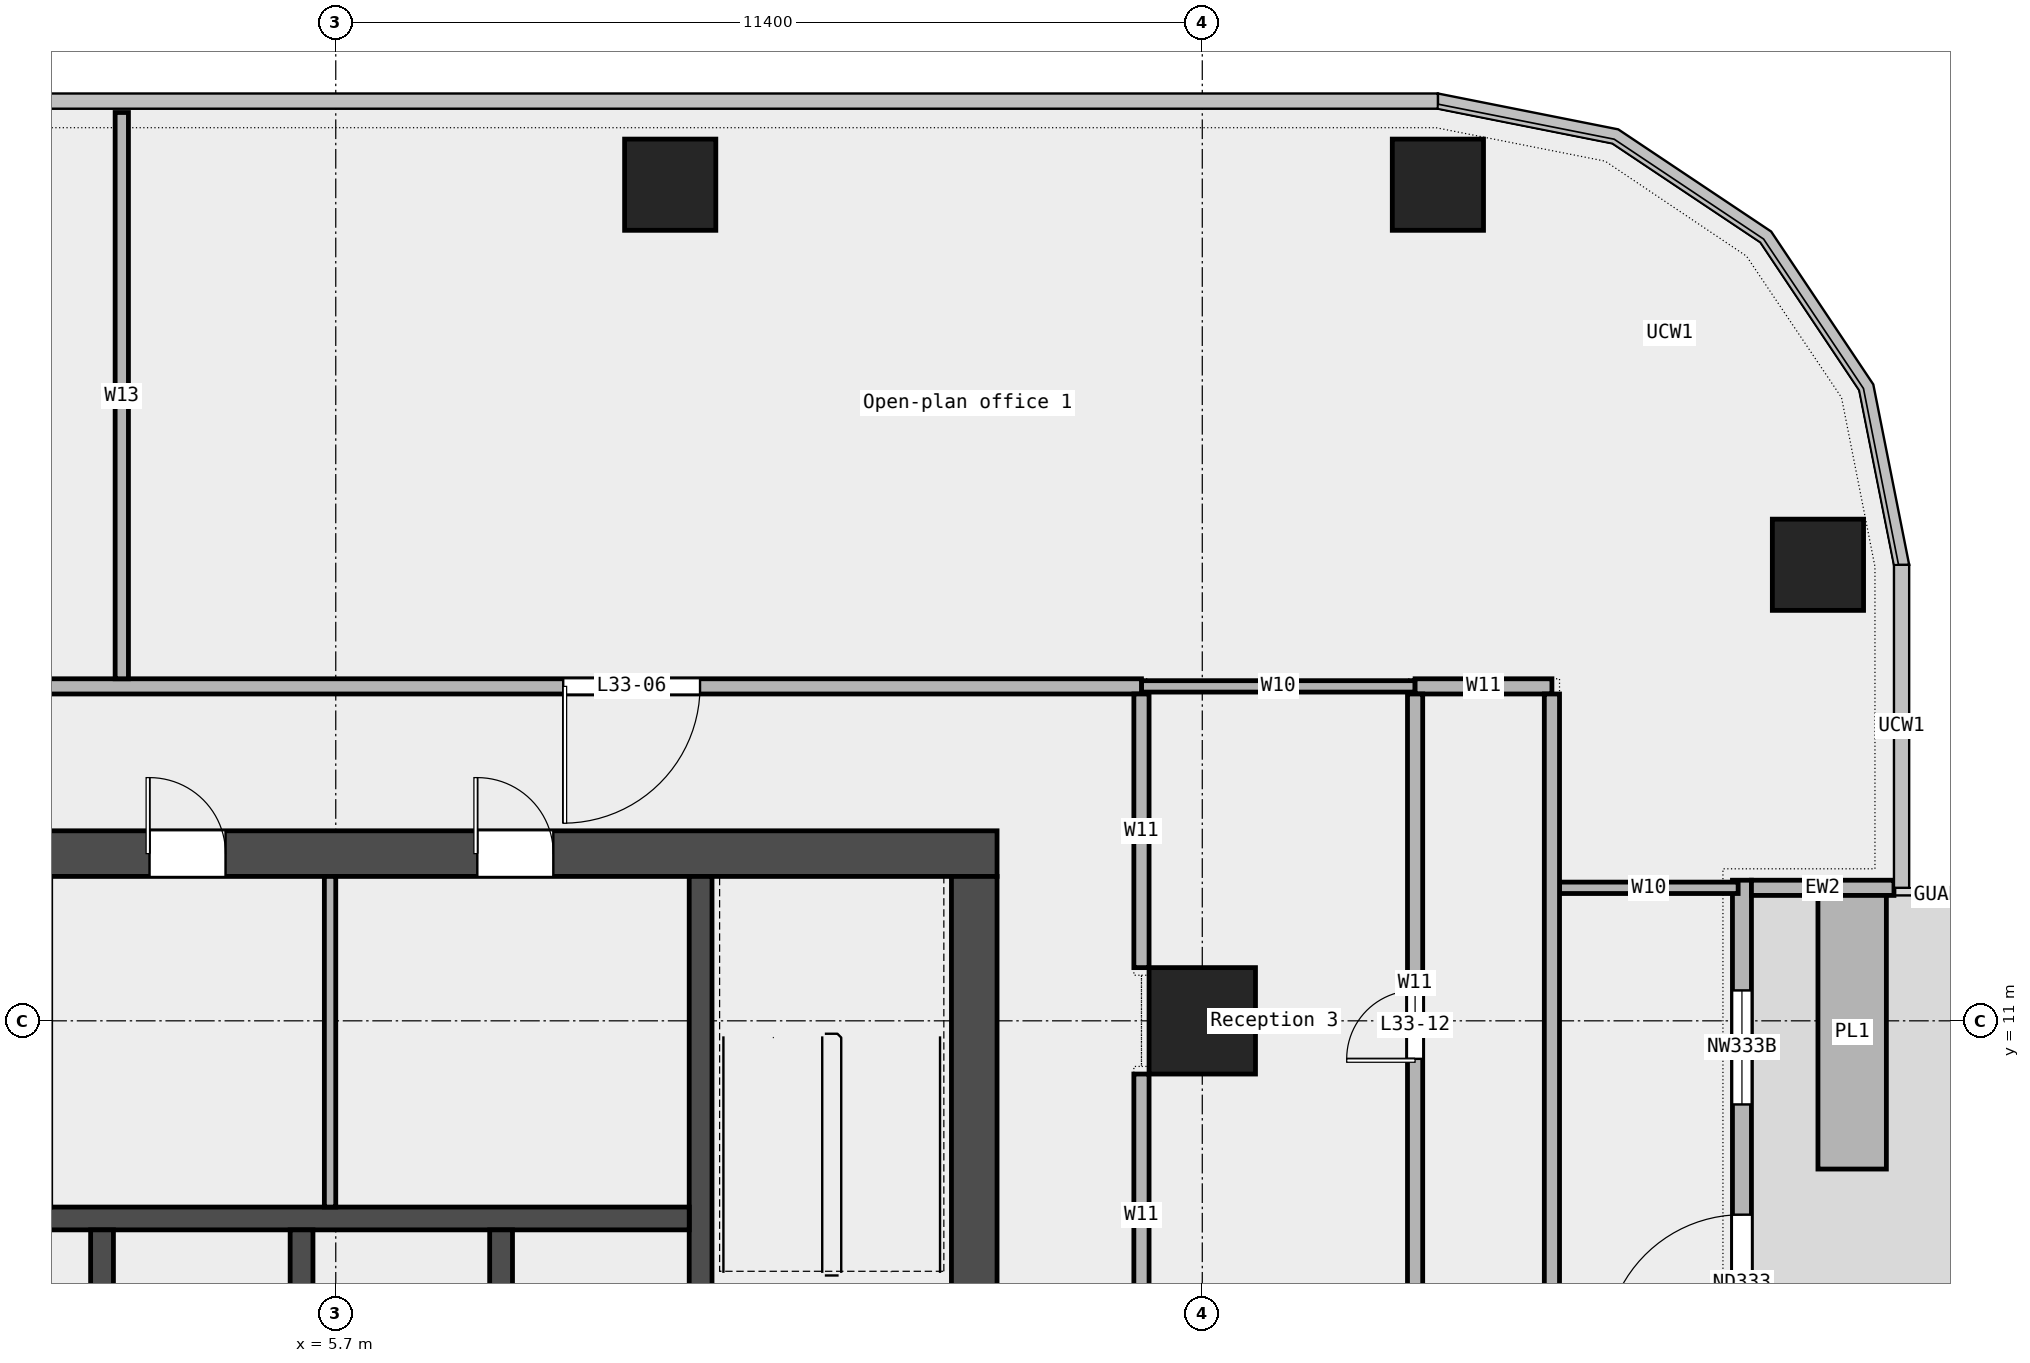
"""IFC4 building model, lengths in metres.
Left out: names, types, materials, properties, quantities, classifications, styles, units other than length and angle.
Written with IfcOpenShell. Run it as: python <this file> out.ifc"""

import sys

from ifc_helpers import new_model, si_unit, direction, frame, frame_2d, origin, origin_2d, place, context, subcontext, project, spatial, rectangle, extrude, element, fill, save


model = new_model("IFC4")
c1 = context("Model", 3, precision=1e-05, world=origin(), true_north=direction((0.0, 1.0)))
c2 = subcontext(c1, "Body", "Model", "MODEL_VIEW")
j1 = project(units=[si_unit("LENGTHUNIT", "METRE"), si_unit("PLANEANGLEUNIT", "RADIAN")], contexts=[c1])
p1 = place(None, origin())
s1 = spatial("IfcSite", under=j1, at=p1, CompositionType="ELEMENT")
p2 = place(p1, origin())
s2 = spatial("IfcBuilding", under=s1, at=p2, CompositionType="ELEMENT")
p3 = place(p2, frame((0.0, 0.0, 165.0)))
s3 = spatial("IfcBuildingStorey", under=s2, at=p3, CompositionType="ELEMENT", Elevation=165.0)
for number, where, z_axis, x_axis in (
    (1, (25.2, 17.0, 0.0), (0.0, 0.0, 1.0), (1.0, 0.0, 0.0)),
    (2, (20.2, 22.0, 0.0), (0.0, 0.0, 1.0), (1.0, 0.0, 0.0)),
    (3, (10.1, 22.0, 0.0), (0.0, 0.0, 1.0), (1.0, 0.0, 0.0)),
):
    element("IfcColumn", number, at=place(p3, frame(where, z_axis=z_axis, x_axis=x_axis)), inside=s3, PredefinedType="COLUMN", context=c2, shape_type="SweptSolid", body=[
        extrude(rectangle(XDim=1.2, YDim=1.2, at=origin_2d()), origin(), (0.0, 0.0, 1.0), 3.6),
    ])
p4 = place(p3, frame((17.1, 11.0, 0.0), z_axis=(0.0, 0.0, 1.0), x_axis=(1.0, 0.0, 0.0)))
e4 = element("IfcColumn", 4, at=p4, inside=s3, PredefinedType="COLUMN", context=c2, shape_type="SweptSolid", body=[
    extrude(rectangle(XDim=1.4, YDim=1.4, at=origin_2d()), origin(), (0.0, 0.0, 1.0), 3.6),
])
p5 = place(p3, frame((24.2, -0.1, 0.0), z_axis=(0.0, 0.0, 1.0), x_axis=(0.0, 1.0, 0.0)))
e5 = element("IfcWall", 5, at=p5, inside=s3, PredefinedType="STANDARD", context=c2, shape_type="SweptSolid", body=[
    extrude(rectangle(XDim=12.95, YDim=0.25, at=frame_2d((6.475, 0.0))), origin(), (0.0, 0.0, 1.0), 3.6),
])
p6 = place(p5, frame((1.5, 0.0, 0.45)))
e6 = element("IfcOpeningElement", 6, at=p6, cuts=e5, PredefinedType="OPENING", context=c2, shape_type="SweptSolid", body=[
    extrude(rectangle(XDim=1.5, YDim=2.4, at=frame_2d((0.75, 1.2))), frame((0.0, 0.137, 0.0), z_axis=(0.0, -1.0, 0.0), x_axis=(1.0, 0.0, 0.0)), (0.0, 0.0, 1.0), 0.274),
])
p7 = place(p5, frame((6.75, 0.0, 0.0)))
e7 = element("IfcOpeningElement", 7, at=p7, cuts=e5, PredefinedType="OPENING", context=c2, shape_type="SweptSolid", body=[
    extrude(rectangle(XDim=1.8, YDim=2.4, at=frame_2d((0.9, 1.2))), frame((0.0, 0.137, 0.0), z_axis=(0.0, -1.0, 0.0), x_axis=(1.0, 0.0, 0.0)), (0.0, 0.0, 1.0), 0.274),
])
p8 = place(p5, frame((10.0, 0.0, 0.45)))
e8 = element("IfcOpeningElement", 8, at=p8, cuts=e5, PredefinedType="OPENING", context=c2, shape_type="SweptSolid", body=[
    extrude(rectangle(XDim=1.5, YDim=2.4, at=frame_2d((0.75, 1.2))), frame((0.0, 0.137, 0.0), z_axis=(0.0, -1.0, 0.0), x_axis=(1.0, 0.0, 0.0)), (0.0, 0.0, 1.0), 0.274),
])
p9 = place(p3, frame((26.2, 12.75, 0.0), z_axis=(0.0, 0.0, 1.0), x_axis=(-1.0, 0.0, 0.0)))
e9 = element("IfcWall", 9, at=p9, inside=s3, PredefinedType="STANDARD", context=c2, shape_type="SweptSolid", body=[
    extrude(rectangle(XDim=1.875, YDim=0.2, at=frame_2d((0.938, 0.0))), origin(), (0.0, 0.0, 1.0), 3.6),
])
p10 = place(p3, frame((25.65, 9.05, 0.0), z_axis=(0.0, 0.0, 1.0), x_axis=(0.0, 1.0, 0.0)))
e10 = element("IfcWall", 10, at=p10, inside=s3, PredefinedType="STANDARD", context=c2, shape_type="SweptSolid", body=[
    extrude(rectangle(XDim=3.6, YDim=0.9, at=frame_2d((1.8, 0.0))), origin(), (0.0, 0.0, 1.0), 0.7),
])
p11 = place(p3, frame((21.8, 12.75, 0.0), z_axis=(0.0, 0.0, 1.0), x_axis=(1.0, 0.0, 0.0)))
e11 = element("IfcWall", 11, at=p11, inside=s3, PredefinedType="PARTITIONING", context=c2, shape_type="SweptSolid", body=[
    extrude(rectangle(XDim=2.35, YDim=0.15, at=frame_2d((1.175, 0.0))), origin(), (0.0, 0.0, 1.0), 3.6),
])
p12 = place(p3, frame((16.3, 15.4, 0.0), z_axis=(0.0, 0.0, 1.0), x_axis=(1.0, 0.0, 0.0)))
e12 = element("IfcWall", 12, at=p12, inside=s3, PredefinedType="PARTITIONING", context=c2, shape_type="SweptSolid", body=[
    extrude(rectangle(XDim=3.6, YDim=0.15, at=frame_2d((1.8, 0.0))), origin(), (0.0, 0.0, 1.0), 3.6),
])
p13 = place(p3, frame((-16.3, 15.4, 0.0), z_axis=(0.0, 0.0, 1.0), x_axis=(1.0, 0.0, 0.0)))
e13 = element("IfcWall", 13, at=p13, inside=s3, PredefinedType="PARTITIONING", context=c2, shape_type="SweptSolid", body=[
    extrude(rectangle(XDim=32.6, YDim=0.2, at=frame_2d((16.3, 0.0))), origin(), (0.0, 0.0, 1.0), 3.6),
])
p14 = place(p13, frame((24.992, 0.0, 0.0)))
e14 = element("IfcOpeningElement", 14, at=p14, cuts=e13, PredefinedType="OPENING", context=c2, shape_type="SweptSolid", body=[
    extrude(rectangle(XDim=1.8, YDim=2.1, at=frame_2d((0.9, 1.05))), frame((0.0, 0.112, 0.0), z_axis=(0.0, -1.0, 0.0), x_axis=(1.0, 0.0, 0.0)), (0.0, 0.0, 1.0), 0.224),
])
p15 = place(p13, frame((9.635, 0.0, 0.0)))
e15 = element("IfcOpeningElement", 15, at=p15, cuts=e13, PredefinedType="OPENING", context=c2, shape_type="SweptSolid", body=[
    extrude(rectangle(XDim=1.8, YDim=2.1, at=frame_2d((0.9, 1.05))), frame((0.0, 0.112, 0.0), z_axis=(0.0, -1.0, 0.0), x_axis=(1.0, 0.0, 0.0)), (0.0, 0.0, 1.0), 0.224),
])
p16 = place(p3, frame((19.9, 15.4, 0.0), z_axis=(0.0, 0.0, 1.0), x_axis=(1.0, 0.0, 0.0)))
e16 = element("IfcWall", 16, at=p16, inside=s3, PredefinedType="PARTITIONING", context=c2, shape_type="SweptSolid", body=[
    extrude(rectangle(XDim=1.8, YDim=0.2, at=frame_2d((0.9, 0.0))), origin(), (0.0, 0.0, 1.0), 3.6),
])
p17 = place(p3, frame((2.885, 15.5, 0.0), z_axis=(0.0, 0.0, 1.0), x_axis=(0.0, 1.0, 0.0)))
e17 = element("IfcWall", 17, at=p17, inside=s3, PredefinedType="PARTITIONING", context=c2, shape_type="SweptSolid", body=[
    extrude(rectangle(XDim=7.45, YDim=0.175, at=frame_2d((3.725, 0.0))), origin(), (0.0, 0.0, 1.0), 3.6),
])
p18 = place(p3, frame((16.3, 6.6, 0.0), z_axis=(0.0, 0.0, 1.0), x_axis=(0.0, 1.0, 0.0)))
e18 = element("IfcWall", 18, at=p18, inside=s3, PredefinedType="PARTITIONING", context=c2, shape_type="SweptSolid", body=[
    extrude(rectangle(XDim=3.7, YDim=0.2, at=frame_2d((1.85, 0.0))), origin(), (0.0, 0.0, 1.0), 3.6),
])
p19 = place(p3, frame((16.3, 11.7, 0.0), z_axis=(0.0, 0.0, 1.0), x_axis=(0.0, 1.0, 0.0)))
e19 = element("IfcWall", 19, at=p19, inside=s3, PredefinedType="PARTITIONING", context=c2, shape_type="SweptSolid", body=[
    extrude(rectangle(XDim=3.6, YDim=0.2, at=frame_2d((1.8, 0.0))), origin(), (0.0, 0.0, 1.0), 3.6),
])
p20 = place(p3, frame((19.9, 6.6, 0.0), z_axis=(0.0, 0.0, 1.0), x_axis=(0.0, 1.0, 0.0)))
e20 = element("IfcWall", 20, at=p20, inside=s3, PredefinedType="PARTITIONING", context=c2, shape_type="SweptSolid", body=[
    extrude(rectangle(XDim=8.7, YDim=0.2, at=frame_2d((4.35, 0.0))), origin(), (0.0, 0.0, 1.0), 3.6),
])
p21 = place(p20, frame((3.9, 0.0, 0.0)))
e21 = element("IfcOpeningElement", 21, at=p21, cuts=e20, PredefinedType="OPENING", context=c2, shape_type="SweptSolid", body=[
    extrude(rectangle(XDim=0.9, YDim=2.1, at=frame_2d((0.45, 1.05))), frame((0.0, 0.112, 0.0), z_axis=(0.0, -1.0, 0.0), x_axis=(1.0, 0.0, 0.0)), (0.0, 0.0, 1.0), 0.224),
])
p22 = place(p3, frame((21.7, -9.0, 0.0), z_axis=(0.0, 0.0, 1.0), x_axis=(0.0, 1.0, 0.0)))
e22 = element("IfcWall", 22, at=p22, inside=s3, PredefinedType="PARTITIONING", context=c2, shape_type="SweptSolid", body=[
    extrude(rectangle(XDim=24.3, YDim=0.2, at=frame_2d((12.15, 0.0))), origin(), (0.0, 0.0, 1.0), 3.6),
])
p23 = place(p22, frame((14.925, 0.0, 0.0)))
e23 = element("IfcOpeningElement", 23, at=p23, cuts=e22, PredefinedType="OPENING", context=c2, shape_type="SweptSolid", body=[
    extrude(rectangle(XDim=0.9, YDim=2.1, at=frame_2d((0.45, 1.05))), frame((0.0, 0.112, 0.0), z_axis=(0.0, -1.0, 0.0), x_axis=(1.0, 0.0, 0.0)), (0.0, 0.0, 1.0), 0.224),
])
p24 = place(p22, frame((2.562, 0.0, 0.0)))
e24 = element("IfcOpeningElement", 24, at=p24, cuts=e22, PredefinedType="OPENING", context=c2, shape_type="SweptSolid", body=[
    extrude(rectangle(XDim=0.9, YDim=2.1, at=frame_2d((0.45, 1.05))), frame((0.0, 0.112, 0.0), z_axis=(0.0, -1.0, 0.0), x_axis=(1.0, 0.0, 0.0)), (0.0, 0.0, 1.0), 0.224),
])
p25 = place(p3, frame((-14.4, 13.2, 0.0), z_axis=(0.0, 0.0, 1.0), x_axis=(1.0, 0.0, 0.0)))
e25 = element("IfcWall", 25, at=p25, inside=s3, PredefinedType="SHEAR", context=c2, shape_type="SweptSolid", body=[
    extrude(rectangle(XDim=28.8, YDim=0.6, at=frame_2d((14.4, 0.0))), origin(), (0.0, 0.0, 1.0), 3.7),
])
p26 = place(p25, frame((4.9, 0.0, 0.0)))
e26 = element("IfcOpeningElement", 26, at=p26, cuts=e25, PredefinedType="OPENING", context=c2, shape_type="SweptSolid", body=[
    extrude(rectangle(XDim=1.0, YDim=2.1, at=frame_2d((0.5, 1.05))), frame((0.0, 0.312, 0.0), z_axis=(0.0, -1.0, 0.0), x_axis=(1.0, 0.0, 0.0)), (0.0, 0.0, 1.0), 0.624),
])
p27 = place(p25, frame((8.087, 0.0, 0.0)))
e27 = element("IfcOpeningElement", 27, at=p27, cuts=e25, PredefinedType="OPENING", context=c2, shape_type="SweptSolid", body=[
    extrude(rectangle(XDim=1.0, YDim=2.1, at=frame_2d((0.5, 1.05))), frame((0.0, 0.312, 0.0), z_axis=(0.0, -1.0, 0.0), x_axis=(1.0, 0.0, 0.0)), (0.0, 0.0, 1.0), 0.624),
])
p28 = place(p25, frame((12.775, 0.0, 0.0)))
e28 = element("IfcOpeningElement", 28, at=p28, cuts=e25, PredefinedType="OPENING", context=c2, shape_type="SweptSolid", body=[
    extrude(rectangle(XDim=1.0, YDim=2.1, at=frame_2d((0.5, 1.05))), frame((0.0, 0.312, 0.0), z_axis=(0.0, -1.0, 0.0), x_axis=(1.0, 0.0, 0.0)), (0.0, 0.0, 1.0), 0.624),
])
p29 = place(p25, frame((17.65, 0.0, 0.0)))
e29 = element("IfcOpeningElement", 29, at=p29, cuts=e25, PredefinedType="OPENING", context=c2, shape_type="SweptSolid", body=[
    extrude(rectangle(XDim=1.0, YDim=2.1, at=frame_2d((0.5, 1.05))), frame((0.0, 0.312, 0.0), z_axis=(0.0, -1.0, 0.0), x_axis=(1.0, 0.0, 0.0)), (0.0, 0.0, 1.0), 0.624),
])
p30 = place(p25, frame((21.962, 0.0, 0.0)))
e30 = element("IfcOpeningElement", 30, at=p30, cuts=e25, PredefinedType="OPENING", context=c2, shape_type="SweptSolid", body=[
    extrude(rectangle(XDim=1.0, YDim=2.1, at=frame_2d((0.5, 1.05))), frame((0.0, 0.312, 0.0), z_axis=(0.0, -1.0, 0.0), x_axis=(1.0, 0.0, 0.0)), (0.0, 0.0, 1.0), 0.624),
])
p31 = place(p3, frame((14.1, -6.6, 0.0), z_axis=(0.0, 0.0, 1.0), x_axis=(0.0, 1.0, 0.0)))
e31 = element("IfcWall", 31, at=p31, inside=s3, PredefinedType="SHEAR", context=c2, shape_type="SweptSolid", body=[
    extrude(rectangle(XDim=19.5, YDim=0.6, at=frame_2d((9.75, 0.0))), origin(), (0.0, 0.0, 1.0), 3.7),
])
p32 = place(p31, frame((9.3, 0.0, 0.0)))
e32 = element("IfcOpeningElement", 32, at=p32, cuts=e31, PredefinedType="OPENING", context=c2, shape_type="SweptSolid", body=[
    extrude(rectangle(XDim=1.8, YDim=2.1, at=frame_2d((0.9, 1.05))), frame((0.0, 0.312, 0.0), z_axis=(0.0, -1.0, 0.0), x_axis=(1.0, 0.0, 0.0)), (0.0, 0.0, 1.0), 0.624),
])
p33 = place(p3, frame((10.5, 5.25, 0.0), z_axis=(0.0, 0.0, 1.0), x_axis=(0.0, 1.0, 0.0)))
e33 = element("IfcWall", 33, at=p33, inside=s3, PredefinedType="SHEAR", context=c2, shape_type="SweptSolid", body=[
    extrude(rectangle(XDim=7.65, YDim=0.3, at=frame_2d((3.825, 0.0))), origin(), (0.0, 0.0, 1.0), 3.7),
])
p34 = place(p3, frame((-10.35, 8.4, 0.0), z_axis=(0.0, 0.0, 1.0), x_axis=(1.0, 0.0, 0.0)))
e34 = element("IfcWall", 34, at=p34, inside=s3, PredefinedType="SOLIDWALL", context=c2, shape_type="SweptSolid", body=[
    extrude(rectangle(XDim=20.7, YDim=0.3, at=frame_2d((10.35, 0.0))), origin(), (0.0, 0.0, 1.0), 3.7),
])
for number, where, z_axis, x_axis in (
    (35, (2.625, 5.55, 0.0), (0.0, 0.0, 1.0), (0.0, 1.0, 0.0)),
    (36, (5.25, 5.55, 0.0), (0.0, 0.0, 1.0), (0.0, 1.0, 0.0)),
    (37, (7.875, 5.55, 0.0), (0.0, 0.0, 1.0), (0.0, 1.0, 0.0)),
):
    element("IfcWall", number, at=place(p3, frame(where, z_axis=z_axis, x_axis=x_axis)), inside=s3, PredefinedType="SOLIDWALL", context=c2, shape_type="SweptSolid", body=[
        extrude(rectangle(XDim=2.7, YDim=0.3, at=frame_2d((1.35, 0.0))), origin(), (0.0, 0.0, 1.0), 3.7),
    ])
p35 = place(p3, frame((5.625, 8.55, 0.0), z_axis=(0.0, 0.0, 1.0), x_axis=(0.0, 1.0, 0.0)))
e38 = element("IfcWall", 38, at=p35, inside=s3, PredefinedType="PARTITIONING", context=c2, shape_type="SweptSolid", body=[
    extrude(rectangle(XDim=4.35, YDim=0.15, at=frame_2d((2.175, 0.0))), origin(), (0.0, 0.0, 1.0), 3.7),
])
p36 = place(p7, origin())
e39 = element("IfcDoor", 39, at=p36, inside=s3, OperationType="DOUBLE_DOOR_SINGLE_SWING", PredefinedType="DOOR", context=c2, shape_type="SweptSolid", body=[
    extrude(rectangle(XDim=1.8, YDim=2.4, at=frame_2d((0.9, 1.2))), frame((0.0, 0.025, 0.0), z_axis=(0.0, -1.0, 0.0), x_axis=(1.0, 0.0, 0.0)), (0.0, 0.0, 1.0), 0.05),
])
fill(e7, e39)
p37 = place(p8, origin())
e40 = element("IfcWindow", 40, at=p37, inside=s3, PartitioningType="SINGLE_PANEL", PredefinedType="WINDOW", context=c2, shape_type="SweptSolid", body=[
    extrude(rectangle(XDim=1.5, YDim=2.4, at=frame_2d((0.75, 1.2))), frame((0.0, 0.03, 0.0), z_axis=(0.0, -1.0, 0.0), x_axis=(1.0, 0.0, 0.0)), (0.0, 0.0, 1.0), 0.06),
])
fill(e8, e40)
p38 = place(p14, origin())
e41 = element("IfcDoor", 41, at=p38, inside=s3, OperationType="DOUBLE_DOOR_SINGLE_SWING", PredefinedType="DOOR", context=c2, shape_type="SweptSolid", body=[
    extrude(rectangle(XDim=1.8, YDim=2.1, at=frame_2d((0.9, 1.05))), frame((0.0, 0.025, 0.0), z_axis=(0.0, -1.0, 0.0), x_axis=(1.0, 0.0, 0.0)), (0.0, 0.0, 1.0), 0.05),
])
fill(e14, e41)
p39 = place(p21, origin())
e42 = element("IfcDoor", 42, at=p39, inside=s3, OperationType="SINGLE_SWING_LEFT", PredefinedType="DOOR", context=c2, shape_type="SweptSolid", body=[
    extrude(rectangle(XDim=0.9, YDim=2.1, at=frame_2d((0.45, 1.05))), frame((0.0, 0.025, 0.0), z_axis=(0.0, -1.0, 0.0), x_axis=(1.0, 0.0, 0.0)), (0.0, 0.0, 1.0), 0.05),
])
fill(e21, e42)
p40 = place(p29, origin())
e43 = element("IfcDoor", 43, at=p40, inside=s3, OperationType="SINGLE_SWING_LEFT", PredefinedType="DOOR", context=c2, shape_type="SweptSolid", body=[
    extrude(rectangle(XDim=1.0, YDim=2.1, at=frame_2d((0.5, 1.05))), frame((0.0, 0.025, 0.0), z_axis=(0.0, -1.0, 0.0), x_axis=(1.0, 0.0, 0.0)), (0.0, 0.0, 1.0), 0.05),
])
fill(e29, e43)
p41 = place(p30, origin())
e44 = element("IfcDoor", 44, at=p41, inside=s3, OperationType="SINGLE_SWING_LEFT", PredefinedType="DOOR", context=c2, shape_type="SweptSolid", body=[
    extrude(rectangle(XDim=1.0, YDim=2.1, at=frame_2d((0.5, 1.05))), frame((0.0, 0.025, 0.0), z_axis=(0.0, -1.0, 0.0), x_axis=(1.0, 0.0, 0.0)), (0.0, 0.0, 1.0), 0.05),
])
fill(e30, e44)
save(model, sys.argv[1])
